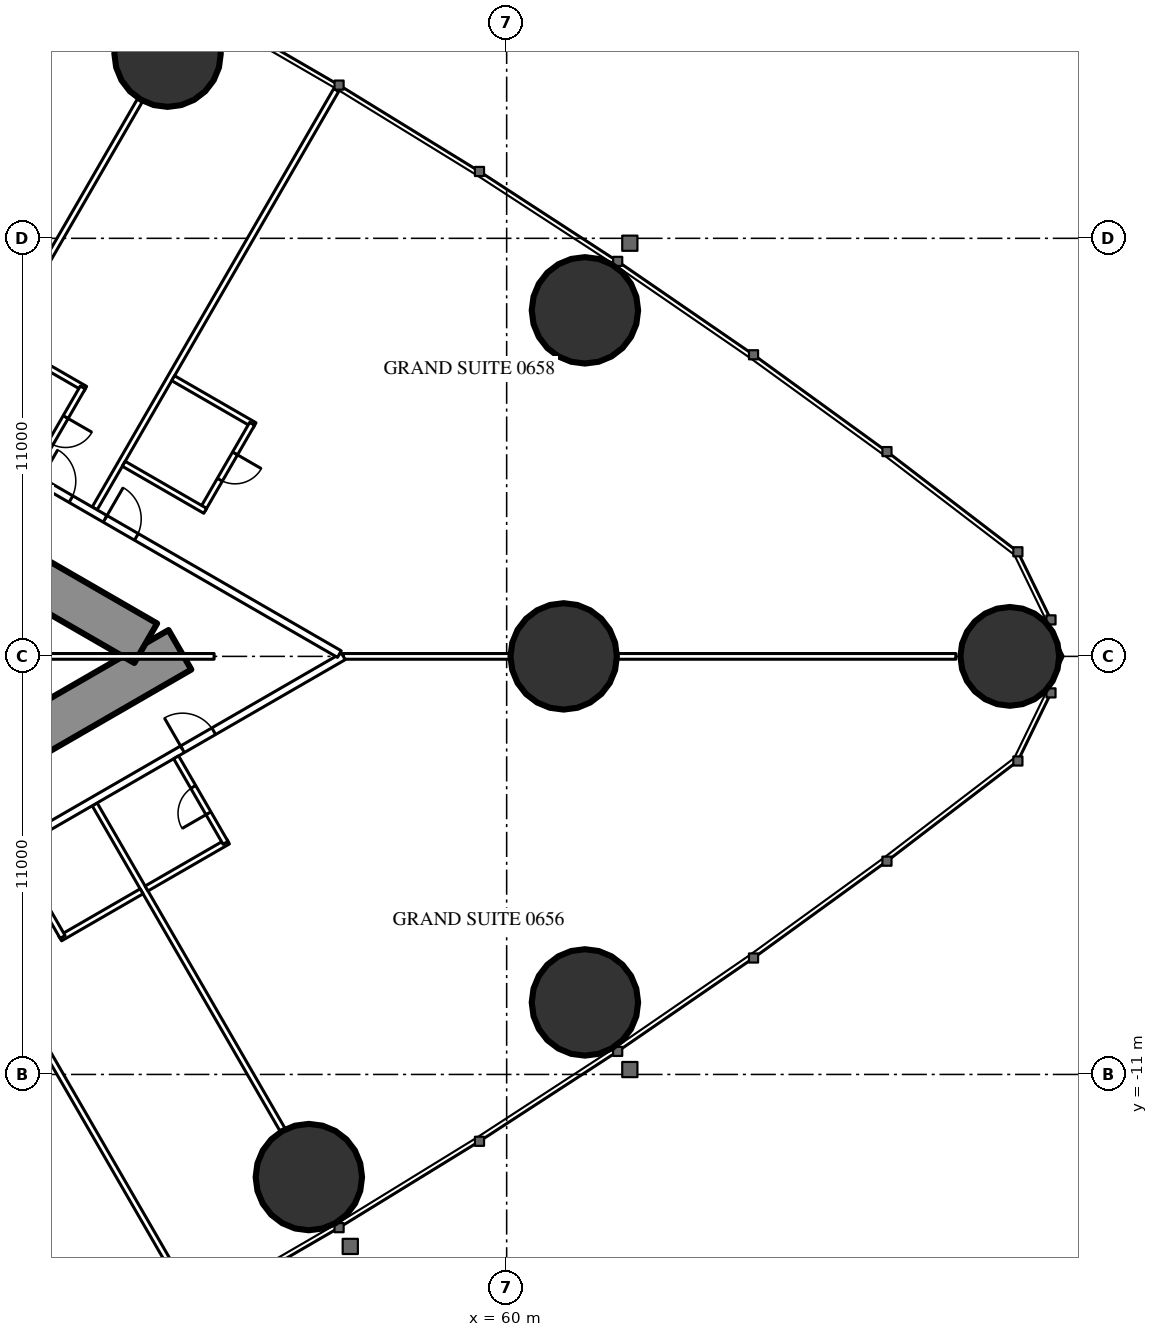
"""IFC4 building model, lengths in metres.
Left out: names, types, materials, properties, quantities, classifications, styles, units other than length and angle.
Written with IfcOpenShell. Run it as: python <this file> out.ifc"""

import sys

from ifc_helpers import new_model, si_unit, direction, frame, frame_2d, origin, origin_2d, place, context, subcontext, project, spatial, rectangle, hollow_circle, extrude, element, fill, save


model = new_model("IFC4")
c1 = context("Model", 3, precision=1e-05, world=origin(), true_north=direction((0.0, 1.0)))
c2 = subcontext(c1, "Body", "Model", "MODEL_VIEW")
j1 = project(units=[si_unit("LENGTHUNIT", "METRE"), si_unit("PLANEANGLEUNIT", "RADIAN")], contexts=[c1])
p1 = place(None, origin())
s1 = spatial("IfcSite", under=j1, at=p1, CompositionType="ELEMENT")
p2 = place(p1, origin())
s2 = spatial("IfcBuilding", under=s1, at=p2, CompositionType="ELEMENT")
p3 = place(p2, frame((0.0, 0.0, 28.5)))
s3 = spatial("IfcBuildingStorey", under=s2, at=p3, CompositionType="ELEMENT", Elevation=28.5)
p4 = place(p3, frame((73.239, 0.0, 0.0), z_axis=(0.0, 0.0, 1.0), x_axis=(1.0, 0.0, 0.0)))
e1 = element("IfcColumn", 1, at=p4, inside=s3, PredefinedType="COLUMN", context=c2, shape_type="SweptSolid", body=[
    extrude(hollow_circle(Radius=1.3, WallThickness=0.1, at=origin_2d()), origin(), (0.0, 0.0, 1.0), 3.5),
])
for number, where, z_axis, x_axis in (
    (2, (62.059, 9.105, 0.0), (0.0, 0.0, 1.0), (1.0, 0.0, 0.0)),
    (3, (51.078, 15.858, 0.0), (0.0, 0.0, 1.0), (1.0, 0.0, 0.0)),
    (4, (54.795, -13.701, 0.0), (0.0, 0.0, 1.0), (1.0, 0.0, 0.0)),
    (5, (62.059, -9.105, 0.0), (0.0, 0.0, 1.0), (1.0, 0.0, 0.0)),
):
    element("IfcColumn", number, at=place(p3, frame(where, z_axis=z_axis, x_axis=x_axis)), inside=s3, PredefinedType="COLUMN", context=c2, shape_type="SweptSolid", body=[
        extrude(hollow_circle(Radius=1.4, WallThickness=0.12, at=origin_2d()), origin(), (0.0, 0.0, 1.0), 3.5),
    ])
p5 = place(p3, frame((61.5, 0.0, 0.0), z_axis=(0.0, 0.0, 1.0), x_axis=(1.0, 0.0, 0.0)))
e6 = element("IfcColumn", 6, at=p5, inside=s3, PredefinedType="COLUMN", context=c2, shape_type="SweptSolid", body=[
    extrude(hollow_circle(Radius=1.4, WallThickness=0.1, at=origin_2d()), origin(), (0.0, 0.0, 1.0), 3.5),
])
p6 = place(p3, frame((27.2, -13.8, 0.0), z_axis=(0.0, 0.0, 1.0), x_axis=(0.866027159892, 0.499996958321, 0.0)))
e7 = element("IfcWall", 7, at=p6, inside=s3, PredefinedType="SHEAR", context=c2, shape_type="SweptSolid", body=[
    extrude(rectangle(XDim=27.947, YDim=1.2, at=frame_2d((13.973, 0.0))), origin(), (0.0, 0.0, 1.0), 3.5),
])
p7 = place(p6, frame((4.6, 0.0, 0.0)))
e8 = element("IfcOpeningElement", 8, at=p7, cuts=e7, PredefinedType="OPENING", context=c2, shape_type="SweptSolid", body=[
    extrude(rectangle(XDim=1.0, YDim=2.2, at=frame_2d((0.5, 1.1))), frame((0.0, 0.61, 0.0), z_axis=(0.0, -1.0, 0.0), x_axis=(1.0, 0.0, 0.0)), (0.0, 0.0, 1.0), 1.22),
])
p8 = place(p6, frame((13.395, 0.0, 0.0)))
e9 = element("IfcOpeningElement", 9, at=p8, cuts=e7, PredefinedType="OPENING", context=c2, shape_type="SweptSolid", body=[
    extrude(rectangle(XDim=1.8, YDim=2.2, at=frame_2d((0.9, 1.1))), frame((0.0, 0.61, 0.0), z_axis=(0.0, -1.0, 0.0), x_axis=(1.0, 0.0, 0.0)), (0.0, 0.0, 1.0), 1.22),
])
p9 = place(p3, frame((27.2, 13.8, 0.0), z_axis=(0.0, 0.0, 1.0), x_axis=(0.866024515034, -0.500001539357, 0.0)))
e10 = element("IfcWall", 10, at=p9, inside=s3, PredefinedType="SHEAR", context=c2, shape_type="SweptSolid", body=[
    extrude(rectangle(XDim=26.907, YDim=1.2, at=frame_2d((13.454, 0.0))), origin(), (0.0, 0.0, 1.0), 3.5),
])
p10 = place(p9, frame((4.6, 0.0, 0.0)))
e11 = element("IfcOpeningElement", 11, at=p10, cuts=e10, PredefinedType="OPENING", context=c2, shape_type="SweptSolid", body=[
    extrude(rectangle(XDim=1.0, YDim=2.2, at=frame_2d((0.5, 1.1))), frame((0.0, 0.61, 0.0), z_axis=(0.0, -1.0, 0.0), x_axis=(1.0, 0.0, 0.0)), (0.0, 0.0, 1.0), 1.22),
])
p11 = place(p9, frame((13.395, 0.0, 0.0)))
e12 = element("IfcOpeningElement", 12, at=p11, cuts=e10, PredefinedType="OPENING", context=c2, shape_type="SweptSolid", body=[
    extrude(rectangle(XDim=1.8, YDim=2.2, at=frame_2d((0.9, 1.1))), frame((0.0, 0.61, 0.0), z_axis=(0.0, -1.0, 0.0), x_axis=(1.0, 0.0, 0.0)), (0.0, 0.0, 1.0), 1.22),
])
p12 = place(p3, frame((45.403, -6.062, 0.0), z_axis=(0.0, 0.0, 1.0), x_axis=(0.500007077968, -0.866021317279, 0.0)))
e13 = element("IfcWall", 13, at=p12, inside=s3, PredefinedType="PARTITIONING", context=c2, shape_type="SweptSolid", body=[
    extrude(rectangle(XDim=12.721, YDim=0.15, at=frame_2d((6.361, 0.0))), origin(), (0.0, 0.0, 1.0), 3.25),
])
p13 = place(p3, frame((49.159, -3.893, 0.0), z_axis=(0.0, 0.0, 1.0), x_axis=(0.499998773722, -0.866026111775, 0.0)))
e14 = element("IfcWall", 14, at=p13, inside=s3, PredefinedType="PARTITIONING", context=c2, shape_type="SweptSolid", body=[
    extrude(rectangle(XDim=9.892, YDim=0.15, at=frame_2d((4.946, 0.0))), origin(), (0.0, 0.0, 1.0), 2.25),
])
p14 = place(p3, frame((45.403, 6.062, 0.0), z_axis=(0.0, 0.0, 1.0), x_axis=(0.500013434677, 0.866017647131, 0.0)))
e15 = element("IfcWall", 15, at=p14, inside=s3, PredefinedType="PARTITIONING", context=c2, shape_type="SweptSolid", body=[
    extrude(rectangle(XDim=9.902, YDim=0.15, at=frame_2d((4.951, 0.0))), origin(), (0.0, 0.0, 1.0), 2.25),
])
p15 = place(p3, frame((49.159, 3.893, 0.0), z_axis=(0.0, 0.0, 1.0), x_axis=(0.499995664361, 0.866027906952, 0.0)))
e16 = element("IfcWall", 16, at=p15, inside=s3, PredefinedType="PARTITIONING", context=c2, shape_type="SweptSolid", body=[
    extrude(rectangle(XDim=12.711, YDim=0.15, at=frame_2d((6.356, 0.0))), origin(), (0.0, 0.0, 1.0), 3.25),
])
p16 = place(p3, frame((55.702, 0.0, 0.0), z_axis=(0.0, 0.0, 1.0), x_axis=(1.0, 0.0, 0.0)))
e17 = element("IfcWall", 17, at=p16, inside=s3, PredefinedType="PARTITIONING", context=c2, shape_type="SweptSolid", body=[
    extrude(rectangle(XDim=16.117, YDim=0.15, at=frame_2d((8.059, 0.0))), origin(), (0.0, 0.0, 1.0), 2.25),
])
p17 = place(p3, frame((37.96, -10.243, 0.0), z_axis=(0.0, 0.0, 1.0), x_axis=(0.866026429433, 0.499998223521, 0.0)))
e18 = element("IfcWall", 18, at=p17, inside=s3, PredefinedType="PARTITIONING", context=c2, shape_type="SweptSolid", body=[
    extrude(rectangle(XDim=20.487, YDim=0.2, at=frame_2d((10.243, 0.0))), origin(), (0.0, 0.0, 1.0), 3.25),
])
p18 = place(p17, frame((4.575, 0.0, 0.0)))
e19 = element("IfcOpeningElement", 19, at=p18, cuts=e18, PredefinedType="OPENING", context=c2, shape_type="SweptSolid", body=[
    extrude(rectangle(XDim=0.95, YDim=2.2, at=frame_2d((0.475, 1.1))), frame((0.0, 0.11, 0.0), z_axis=(0.0, -1.0, 0.0), x_axis=(1.0, 0.0, 0.0)), (0.0, 0.0, 1.0), 0.22),
])
p19 = place(p17, frame((9.199, 0.0, 0.0)))
e20 = element("IfcOpeningElement", 20, at=p19, cuts=e18, PredefinedType="OPENING", context=c2, shape_type="SweptSolid", body=[
    extrude(rectangle(XDim=0.95, YDim=2.2, at=frame_2d((0.475, 1.1))), frame((0.0, 0.11, 0.0), z_axis=(0.0, -1.0, 0.0), x_axis=(1.0, 0.0, 0.0)), (0.0, 0.0, 1.0), 0.22),
])
p20 = place(p17, frame((15.599, 0.0, 0.0)))
e21 = element("IfcOpeningElement", 21, at=p20, cuts=e18, PredefinedType="OPENING", context=c2, shape_type="SweptSolid", body=[
    extrude(rectangle(XDim=0.95, YDim=2.2, at=frame_2d((0.475, 1.1))), frame((0.0, 0.11, 0.0), z_axis=(0.0, -1.0, 0.0), x_axis=(1.0, 0.0, 0.0)), (0.0, 0.0, 1.0), 0.22),
])
p21 = place(p17, frame((2.875, 0.0, 0.0)))
e22 = element("IfcOpeningElement", 22, at=p21, cuts=e18, PredefinedType="OPENING", context=c2, shape_type="SweptSolid", body=[
    extrude(rectangle(XDim=0.95, YDim=2.2, at=frame_2d((0.475, 1.1))), frame((0.0, 0.11, 0.0), z_axis=(0.0, -1.0, 0.0), x_axis=(1.0, 0.0, 0.0)), (0.0, 0.0, 1.0), 0.22),
])
p22 = place(p3, frame((41.619, 8.131, 0.0), z_axis=(0.0, 0.0, 1.0), x_axis=(0.86603245327, -0.499987789734, 0.0)))
e23 = element("IfcWall", 23, at=p22, inside=s3, PredefinedType="PARTITIONING", context=c2, shape_type="SweptSolid", body=[
    extrude(rectangle(XDim=16.142, YDim=0.2, at=frame_2d((8.071, 0.0))), origin(), (0.0, 0.0, 1.0), 3.25),
])
p23 = place(p22, frame((9.024, 0.0, 0.0)))
e24 = element("IfcOpeningElement", 24, at=p23, cuts=e23, PredefinedType="OPENING", context=c2, shape_type="SweptSolid", body=[
    extrude(rectangle(XDim=0.95, YDim=2.2, at=frame_2d((0.475, 1.1))), frame((0.0, 0.11, 0.0), z_axis=(0.0, -1.0, 0.0), x_axis=(1.0, 0.0, 0.0)), (0.0, 0.0, 1.0), 0.22),
])
p24 = place(p22, frame((7.037, 0.0, 0.0)))
e25 = element("IfcOpeningElement", 25, at=p24, cuts=e23, PredefinedType="OPENING", context=c2, shape_type="SweptSolid", body=[
    extrude(rectangle(XDim=0.95, YDim=2.2, at=frame_2d((0.475, 1.1))), frame((0.0, 0.11, 0.0), z_axis=(0.0, -1.0, 0.0), x_axis=(1.0, 0.0, 0.0)), (0.0, 0.0, 1.0), 0.22),
])
p25 = place(p22, frame((2.987, 0.0, 0.0)))
e26 = element("IfcOpeningElement", 26, at=p25, cuts=e23, PredefinedType="OPENING", context=c2, shape_type="SweptSolid", body=[
    extrude(rectangle(XDim=0.95, YDim=2.2, at=frame_2d((0.475, 1.1))), frame((0.0, 0.11, 0.0), z_axis=(0.0, -1.0, 0.0), x_axis=(1.0, 0.0, 0.0)), (0.0, 0.0, 1.0), 0.22),
])
p26 = place(p3, frame((48.251, -7.42, 0.0), z_axis=(0.0, 0.0, 1.0), x_axis=(0.866006523861, 0.500032699561, 0.0)))
e27 = element("IfcWall", 27, at=p26, inside=s3, PredefinedType="PARTITIONING", context=c2, shape_type="SweptSolid", body=[
    extrude(rectangle(XDim=2.475, YDim=0.15, at=frame_2d((1.237, 0.0))), origin(), (0.0, 0.0, 1.0), 3.25),
])
p27 = place(p3, frame((47.016, -5.13, 0.0), z_axis=(0.0, 0.0, 1.0), x_axis=(0.500006934395, -0.866021400173, 0.0)))
e28 = element("IfcWall", 28, at=p27, inside=s3, PredefinedType="PARTITIONING", context=c2, shape_type="SweptSolid", body=[
    extrude(rectangle(XDim=2.6, YDim=0.15, at=frame_2d((1.3, 0.0))), origin(), (0.0, 0.0, 1.0), 3.25),
])
p28 = place(p27, frame((0.9, 0.0, 0.0)))
e29 = element("IfcOpeningElement", 29, at=p28, cuts=e28, PredefinedType="OPENING", context=c2, shape_type="SweptSolid", body=[
    extrude(rectangle(XDim=0.8, YDim=2.2, at=frame_2d((0.4, 1.1))), frame((0.0, 0.085, 0.0), z_axis=(0.0, -1.0, 0.0), x_axis=(1.0, 0.0, 0.0)), (0.0, 0.0, 1.0), 0.17),
])
p29 = place(p3, frame((50.524, -6.107, 0.0), z_axis=(0.0, 0.0, 1.0), x_axis=(0.866031185235, 0.4999899861, 0.0)))
e30 = element("IfcWall", 30, at=p29, inside=s3, PredefinedType="PARTITIONING", context=c2, shape_type="SweptSolid", body=[
    extrude(rectangle(XDim=2.475, YDim=0.15, at=frame_2d((1.238, 0.0))), origin(), (0.0, 0.0, 1.0), 3.25),
])
p30 = place(p3, frame((51.303, -2.656, 0.0), z_axis=(0.0, 0.0, 1.0), x_axis=(0.500047596559, -0.865997922154, 0.0)))
e31 = element("IfcWall", 31, at=p30, inside=s3, PredefinedType="PARTITIONING", context=c2, shape_type="SweptSolid", body=[
    extrude(rectangle(XDim=2.6, YDim=0.15, at=frame_2d((1.3, 0.0))), origin(), (0.0, 0.0, 1.0), 3.25),
])
p31 = place(p30, frame((0.9, 0.0, 0.0)))
e32 = element("IfcOpeningElement", 32, at=p31, cuts=e31, PredefinedType="OPENING", context=c2, shape_type="SweptSolid", body=[
    extrude(rectangle(XDim=0.8, YDim=2.2, at=frame_2d((0.4, 1.1))), frame((0.0, 0.085, 0.0), z_axis=(0.0, -1.0, 0.0), x_axis=(1.0, 0.0, 0.0)), (0.0, 0.0, 1.0), 0.17),
])
p32 = place(p3, frame((51.224, 7.32, 0.0), z_axis=(0.0, 0.0, 1.0), x_axis=(0.866031185235, -0.4999899861, 0.0)))
e33 = element("IfcWall", 33, at=p32, inside=s3, PredefinedType="PARTITIONING", context=c2, shape_type="SweptSolid", body=[
    extrude(rectangle(XDim=2.475, YDim=0.15, at=frame_2d((1.238, 0.0))), origin(), (0.0, 0.0, 1.0), 3.25),
])
p33 = place(p3, frame((52.003, 3.868, 0.0), z_axis=(0.0, 0.0, 1.0), x_axis=(0.500047596559, 0.865997922154, 0.0)))
e34 = element("IfcWall", 34, at=p33, inside=s3, PredefinedType="PARTITIONING", context=c2, shape_type="SweptSolid", body=[
    extrude(rectangle(XDim=2.6, YDim=0.15, at=frame_2d((1.3, 0.0))), origin(), (0.0, 0.0, 1.0), 3.25),
])
p34 = place(p33, frame((0.9, 0.0, 0.0)))
e35 = element("IfcOpeningElement", 35, at=p34, cuts=e34, PredefinedType="OPENING", context=c2, shape_type="SweptSolid", body=[
    extrude(rectangle(XDim=0.8, YDim=2.2, at=frame_2d((0.4, 1.1))), frame((0.0, 0.085, 0.0), z_axis=(0.0, -1.0, 0.0), x_axis=(1.0, 0.0, 0.0)), (0.0, 0.0, 1.0), 0.17),
])
p35 = place(p3, frame((49.925, 5.068, 0.0), z_axis=(0.0, 0.0, 1.0), x_axis=(0.866006523861, -0.500032699561, 0.0)))
e36 = element("IfcWall", 36, at=p35, inside=s3, PredefinedType="PARTITIONING", context=c2, shape_type="SweptSolid", body=[
    extrude(rectangle(XDim=2.475, YDim=0.15, at=frame_2d((1.237, 0.0))), origin(), (0.0, 0.0, 1.0), 3.25),
])
p36 = place(p3, frame((46.768, 8.276, 0.0), z_axis=(0.0, 0.0, 1.0), x_axis=(0.866031185235, -0.4999899861, 0.0)))
e37 = element("IfcWall", 37, at=p36, inside=s3, PredefinedType="PARTITIONING", context=c2, shape_type="SweptSolid", body=[
    extrude(rectangle(XDim=2.475, YDim=0.15, at=frame_2d((1.238, 0.0))), origin(), (0.0, 0.0, 1.0), 3.25),
])
p37 = place(p3, frame((47.546, 4.824, 0.0), z_axis=(0.0, 0.0, 1.0), x_axis=(0.500006934395, 0.866021400173, 0.0)))
e38 = element("IfcWall", 38, at=p37, inside=s3, PredefinedType="PARTITIONING", context=c2, shape_type="SweptSolid", body=[
    extrude(rectangle(XDim=2.6, YDim=0.15, at=frame_2d((1.3, 0.0))), origin(), (0.0, 0.0, 1.0), 3.25),
])
p38 = place(p37, frame((0.9, 0.0, 0.0)))
e39 = element("IfcOpeningElement", 39, at=p38, cuts=e38, PredefinedType="OPENING", context=c2, shape_type="SweptSolid", body=[
    extrude(rectangle(XDim=0.8, YDim=2.2, at=frame_2d((0.4, 1.1))), frame((0.0, 0.085, 0.0), z_axis=(0.0, -1.0, 0.0), x_axis=(1.0, 0.0, 0.0)), (0.0, 0.0, 1.0), 0.17),
])
p39 = place(p3, frame((44.575, 0.0, 0.0), z_axis=(0.0, 0.0, 1.0), x_axis=(1.0, 0.0, 0.0)))
e40 = element("IfcWall", 40, at=p39, inside=s3, PredefinedType="PARTITIONING", context=c2, shape_type="SweptSolid", body=[
    extrude(rectangle(XDim=7.727, YDim=0.15, at=frame_2d((3.864, 0.0))), origin(), (0.0, 0.0, 1.0), 2.25),
])
p40 = place(p31, origin())
e41 = element("IfcDoor", 41, at=p40, inside=s3, OperationType="SINGLE_SWING_RIGHT", PredefinedType="DOOR", context=c2, shape_type="SweptSolid", body=[
    extrude(rectangle(XDim=0.8, YDim=2.2, at=frame_2d((0.4, 1.1))), frame((0.0, 0.025, 0.0), z_axis=(0.0, -1.0, 0.0), x_axis=(1.0, 0.0, 0.0)), (0.0, 0.0, 1.0), 0.05),
])
fill(e32, e41)
p41 = place(p20, origin())
e42 = element("IfcDoor", 42, at=p41, inside=s3, OperationType="SINGLE_SWING_LEFT", PredefinedType="DOOR", context=c2, shape_type="SweptSolid", body=[
    extrude(rectangle(XDim=0.95, YDim=2.2, at=frame_2d((0.475, 1.1))), frame((0.0, 0.025, 0.0), z_axis=(0.0, -1.0, 0.0), x_axis=(1.0, 0.0, 0.0)), (0.0, 0.0, 1.0), 0.05),
])
fill(e21, e42)
p42 = place(p34, origin())
e43 = element("IfcDoor", 43, at=p42, inside=s3, OperationType="SINGLE_SWING_RIGHT", PredefinedType="DOOR", context=c2, shape_type="SweptSolid", body=[
    extrude(rectangle(XDim=0.8, YDim=2.2, at=frame_2d((0.4, 1.1))), frame((0.0, 0.025, 0.0), z_axis=(0.0, -1.0, 0.0), x_axis=(1.0, 0.0, 0.0)), (0.0, 0.0, 1.0), 0.05),
])
fill(e35, e43)
p43 = place(p23, origin())
e44 = element("IfcDoor", 44, at=p43, inside=s3, OperationType="SINGLE_SWING_LEFT", PredefinedType="DOOR", context=c2, shape_type="SweptSolid", body=[
    extrude(rectangle(XDim=0.95, YDim=2.2, at=frame_2d((0.475, 1.1))), frame((0.0, 0.025, 0.0), z_axis=(0.0, -1.0, 0.0), x_axis=(1.0, 0.0, 0.0)), (0.0, 0.0, 1.0), 0.05),
])
fill(e24, e44)
p44 = place(p38, origin())
e45 = element("IfcDoor", 45, at=p44, inside=s3, OperationType="SINGLE_SWING_RIGHT", PredefinedType="DOOR", context=c2, shape_type="SweptSolid", body=[
    extrude(rectangle(XDim=0.8, YDim=2.2, at=frame_2d((0.4, 1.1))), frame((0.0, 0.025, 0.0), z_axis=(0.0, -1.0, 0.0), x_axis=(1.0, 0.0, 0.0)), (0.0, 0.0, 1.0), 0.05),
])
fill(e39, e45)
p45 = place(p24, origin())
e46 = element("IfcDoor", 46, at=p45, inside=s3, OperationType="SINGLE_SWING_LEFT", PredefinedType="DOOR", context=c2, shape_type="SweptSolid", body=[
    extrude(rectangle(XDim=0.95, YDim=2.2, at=frame_2d((0.475, 1.1))), frame((0.0, 0.025, 0.0), z_axis=(0.0, -1.0, 0.0), x_axis=(1.0, 0.0, 0.0)), (0.0, 0.0, 1.0), 0.05),
])
fill(e25, e46)
save(model, sys.argv[1])
